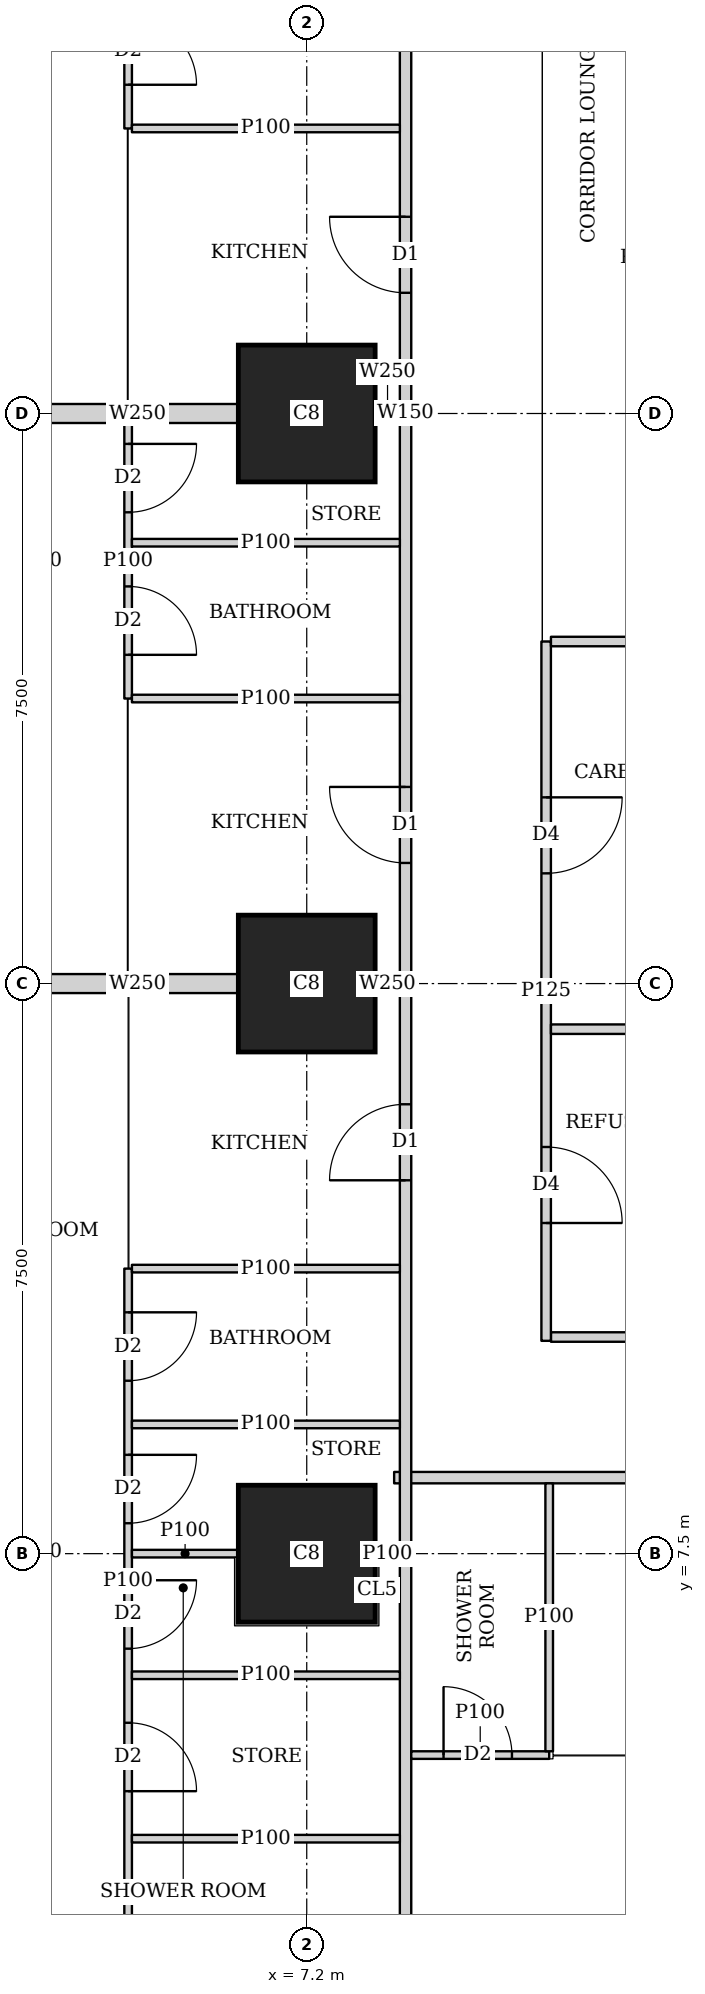
"""IFC4 building model, lengths in metres.
Left out: names, types, materials, properties, quantities, classifications, styles, units other than length and angle.
Written with IfcOpenShell. Run it as: python <this file> out.ifc"""

import sys

from ifc_helpers import new_model, si_unit, direction, frame, frame_2d, origin, origin_2d, place, context, subcontext, project, spatial, rectangle, extrude, element, fill, save


model = new_model("IFC4")
c1 = context("Model", 3, precision=1e-05, world=origin(), true_north=direction((0.0, 1.0)))
c2 = subcontext(c1, "Body", "Model", "MODEL_VIEW")
j1 = project(units=[si_unit("LENGTHUNIT", "METRE"), si_unit("PLANEANGLEUNIT", "RADIAN")], contexts=[c1])
p1 = place(None, origin())
s1 = spatial("IfcSite", under=j1, at=p1, CompositionType="ELEMENT")
p2 = place(p1, origin())
s2 = spatial("IfcBuilding", under=s1, at=p2, CompositionType="ELEMENT")
p3 = place(p2, frame((0.0, 0.0, 42.5)))
s3 = spatial("IfcBuildingStorey", under=s2, at=p3, CompositionType="ELEMENT", Elevation=42.5)
for number, where, z_axis, x_axis in (
    (1, (7.2, 7.5, 0.0), (0.0, 0.0, 1.0), (1.0, 0.0, 0.0)),
    (2, (7.2, 15.0, 0.0), (0.0, 0.0, 1.0), (1.0, 0.0, 0.0)),
    (3, (7.2, 22.5, 0.0), (0.0, 0.0, 1.0), (1.0, 0.0, 0.0)),
):
    element("IfcColumn", number, at=place(p3, frame(where, z_axis=z_axis, x_axis=x_axis)), inside=s3, PredefinedType="COLUMN", context=c2, shape_type="SweptSolid", body=[
        extrude(rectangle(XDim=1.8, YDim=1.8, at=origin_2d()), origin(), (0.0, 0.0, 1.0), 3.75),
    ])
p4 = place(p3, frame((8.5, 2.426, 0.0), z_axis=(0.0, 0.0, 1.0), x_axis=(0.0, 1.0, 0.0)))
e4 = element("IfcWall", 4, at=p4, inside=s3, PredefinedType="SOLIDWALL", context=c2, shape_type="SweptSolid", body=[
    extrude(rectangle(XDim=40.173, YDim=0.15, at=frame_2d((20.086, 0.0))), origin(), (0.0, 0.0, 1.0), 3.5),
])
p5 = place(p4, frame((9.986, 0.0, 0.0)))
e5 = element("IfcOpeningElement", 5, at=p5, cuts=e4, PredefinedType="OPENING", context=c2, shape_type="SweptSolid", body=[
    extrude(rectangle(XDim=1.0, YDim=2.1, at=frame_2d((0.5, 1.05))), frame((0.0, 0.085, 0.0), z_axis=(0.0, -1.0, 0.0), x_axis=(1.0, 0.0, 0.0)), (0.0, 0.0, 1.0), 0.17),
])
p6 = place(p4, frame((14.161, 0.0, 0.0)))
e6 = element("IfcOpeningElement", 6, at=p6, cuts=e4, PredefinedType="OPENING", context=c2, shape_type="SweptSolid", body=[
    extrude(rectangle(XDim=1.0, YDim=2.1, at=frame_2d((0.5, 1.05))), frame((0.0, 0.085, 0.0), z_axis=(0.0, -1.0, 0.0), x_axis=(1.0, 0.0, 0.0)), (0.0, 0.0, 1.0), 0.17),
])
p7 = place(p4, frame((21.662, 0.0, 0.0)))
e7 = element("IfcOpeningElement", 7, at=p7, cuts=e4, PredefinedType="OPENING", context=c2, shape_type="SweptSolid", body=[
    extrude(rectangle(XDim=1.0, YDim=2.1, at=frame_2d((0.5, 1.05))), frame((0.0, 0.085, 0.0), z_axis=(0.0, -1.0, 0.0), x_axis=(1.0, 0.0, 0.0)), (0.0, 0.0, 1.0), 0.17),
])
p8 = place(p4, frame((29.161, 0.0, 0.0)))
e8 = element("IfcOpeningElement", 8, at=p8, cuts=e4, PredefinedType="OPENING", context=c2, shape_type="SweptSolid", body=[
    extrude(rectangle(XDim=1.0, YDim=2.1, at=frame_2d((0.5, 1.05))), frame((0.0, 0.085, 0.0), z_axis=(0.0, -1.0, 0.0), x_axis=(1.0, 0.0, 0.0)), (0.0, 0.0, 1.0), 0.17),
])
p9 = place(p3, frame((40.054, 8.5, 0.0), z_axis=(0.0, 0.0, 1.0), x_axis=(-1.0, 0.0, 0.0)))
e9 = element("IfcWall", 9, at=p9, inside=s3, PredefinedType="SOLIDWALL", context=c2, shape_type="SweptSolid", body=[
    extrude(rectangle(XDim=31.704, YDim=0.15, at=frame_2d((15.852, 0.0))), origin(), (0.0, 0.0, 1.0), 3.5),
])
p10 = place(p9, frame((27.321, 0.0, 0.0)))
e10 = element("IfcOpeningElement", 10, at=p10, cuts=e9, PredefinedType="OPENING", context=c2, shape_type="SweptSolid", body=[
    extrude(rectangle(XDim=1.0, YDim=2.1, at=frame_2d((0.5, 1.05))), frame((0.0, 0.085, 0.0), z_axis=(0.0, -1.0, 0.0), x_axis=(1.0, 0.0, 0.0)), (0.0, 0.0, 1.0), 0.17),
])
p11 = place(p9, frame((23.054, 0.0, 0.0)))
e11 = element("IfcOpeningElement", 11, at=p11, cuts=e9, PredefinedType="OPENING", context=c2, shape_type="SweptSolid", body=[
    extrude(rectangle(XDim=1.0, YDim=2.1, at=frame_2d((0.5, 1.05))), frame((0.0, 0.085, 0.0), z_axis=(0.0, -1.0, 0.0), x_axis=(1.0, 0.0, 0.0)), (0.0, 0.0, 1.0), 0.17),
])
p12 = place(p9, frame((15.854, 0.0, 0.0)))
e12 = element("IfcOpeningElement", 12, at=p12, cuts=e9, PredefinedType="OPENING", context=c2, shape_type="SweptSolid", body=[
    extrude(rectangle(XDim=1.0, YDim=2.1, at=frame_2d((0.5, 1.05))), frame((0.0, 0.085, 0.0), z_axis=(0.0, -1.0, 0.0), x_axis=(1.0, 0.0, 0.0)), (0.0, 0.0, 1.0), 0.17),
])
p13 = place(p9, frame((8.654, 0.0, 0.0)))
e13 = element("IfcOpeningElement", 13, at=p13, cuts=e9, PredefinedType="OPENING", context=c2, shape_type="SweptSolid", body=[
    extrude(rectangle(XDim=1.0, YDim=2.1, at=frame_2d((0.5, 1.05))), frame((0.0, 0.085, 0.0), z_axis=(0.0, -1.0, 0.0), x_axis=(1.0, 0.0, 0.0)), (0.0, 0.0, 1.0), 0.17),
])
p14 = place(p9, frame((0.15, 0.0, 0.0)))
e14 = element("IfcOpeningElement", 14, at=p14, cuts=e9, PredefinedType="OPENING", context=c2, shape_type="SweptSolid", body=[
    extrude(rectangle(XDim=1.0, YDim=2.1, at=frame_2d((0.5, 1.05))), frame((0.0, 0.085, 0.0), z_axis=(0.0, -1.0, 0.0), x_axis=(1.0, 0.0, 0.0)), (0.0, 0.0, 1.0), 0.17),
])
p15 = place(p3, frame((4.85, 0.121, 0.0), z_axis=(0.0, 0.0, 1.0), x_axis=(0.0, 1.0, 0.0)))
e15 = element("IfcWall", 15, at=p15, inside=s3, PredefinedType="PARTITIONING", context=c2, shape_type="SweptSolid", body=[
    extrude(rectangle(XDim=2.897, YDim=0.1, at=frame_2d((1.448, 0.0))), origin(), (0.0, 0.0, 1.0), 2.05),
])
p16 = place(p3, frame((4.85, 3.018, 0.0), z_axis=(0.0, 0.0, 1.0), x_axis=(0.0, 1.0, 0.0)))
e16 = element("IfcWall", 16, at=p16, inside=s3, PredefinedType="PARTITIONING", context=c2, shape_type="SweptSolid", body=[
    extrude(rectangle(XDim=8.232, YDim=0.1, at=frame_2d((4.116, 0.0))), origin(), (0.0, 0.0, 1.0), 3.5),
])
p17 = place(p16, frame((6.757, 0.0, 0.0)))
e17 = element("IfcOpeningElement", 17, at=p17, cuts=e16, PredefinedType="OPENING", context=c2, shape_type="SweptSolid", body=[
    extrude(rectangle(XDim=0.9, YDim=2.1, at=frame_2d((0.45, 1.05))), frame((0.0, 0.06, 0.0), z_axis=(0.0, -1.0, 0.0), x_axis=(1.0, 0.0, 0.0)), (0.0, 0.0, 1.0), 0.12),
])
p18 = place(p16, frame((3.232, 0.0, 0.0)))
e18 = element("IfcOpeningElement", 18, at=p18, cuts=e16, PredefinedType="OPENING", context=c2, shape_type="SweptSolid", body=[
    extrude(rectangle(XDim=0.9, YDim=2.1, at=frame_2d((0.45, 1.05))), frame((0.0, 0.06, 0.0), z_axis=(0.0, -1.0, 0.0), x_axis=(1.0, 0.0, 0.0)), (0.0, 0.0, 1.0), 0.12),
])
p19 = place(p16, frame((4.882, 0.0, 0.0)))
e19 = element("IfcOpeningElement", 19, at=p19, cuts=e16, PredefinedType="OPENING", context=c2, shape_type="SweptSolid", body=[
    extrude(rectangle(XDim=0.9, YDim=2.1, at=frame_2d((0.45, 1.05))), frame((0.0, 0.06, 0.0), z_axis=(0.0, -1.0, 0.0), x_axis=(1.0, 0.0, 0.0)), (0.0, 0.0, 1.0), 0.12),
])
p20 = place(p16, frame((1.357, 0.0, 0.0)))
e20 = element("IfcOpeningElement", 20, at=p20, cuts=e16, PredefinedType="OPENING", context=c2, shape_type="SweptSolid", body=[
    extrude(rectangle(XDim=0.9, YDim=2.1, at=frame_2d((0.45, 1.05))), frame((0.0, 0.06, 0.0), z_axis=(0.0, -1.0, 0.0), x_axis=(1.0, 0.0, 0.0)), (0.0, 0.0, 1.0), 0.12),
])
p21 = place(p3, frame((4.9, 3.75, 0.0), z_axis=(0.0, 0.0, 1.0), x_axis=(1.0, 0.0, 0.0)))
e21 = element("IfcWall", 21, at=p21, inside=s3, PredefinedType="PARTITIONING", context=c2, shape_type="SweptSolid", body=[
    extrude(rectangle(XDim=3.525, YDim=0.1, at=frame_2d((1.763, 0.0))), origin(), (0.0, 0.0, 1.0), 3.5),
])
p22 = place(p3, frame((4.9, 7.5, 0.0), z_axis=(0.0, 0.0, 1.0), x_axis=(1.0, 0.0, 0.0)))
e22 = element("IfcWall", 22, at=p22, inside=s3, PredefinedType="PARTITIONING", context=c2, shape_type="SweptSolid", body=[
    extrude(rectangle(XDim=1.399, YDim=0.1, at=frame_2d((0.7, 0.0))), origin(), (0.0, 0.0, 1.0), 3.5),
])
p23 = place(p3, frame((8.101, 7.5, 0.0), z_axis=(0.0, 0.0, 1.0), x_axis=(1.0, 0.0, 0.0)))
e23 = element("IfcWall", 23, at=p23, inside=s3, PredefinedType="PARTITIONING", context=c2, shape_type="SweptSolid", body=[
    extrude(rectangle(XDim=0.324, YDim=0.1, at=frame_2d((0.162, 0.0))), origin(), (0.0, 0.0, 1.0), 3.5),
])
for number, where, z_axis, x_axis in (
    (24, (4.9, 11.25, 0.0), (0.0, 0.0, 1.0), (1.0, 0.0, 0.0)),
    (25, (4.9, 9.2, 0.0), (0.0, 0.0, 1.0), (1.0, 0.0, 0.0)),
    (26, (4.9, 5.9, 0.0), (0.0, 0.0, 1.0), (1.0, 0.0, 0.0)),
):
    element("IfcWall", number, at=place(p3, frame(where, z_axis=z_axis, x_axis=x_axis)), inside=s3, PredefinedType="PARTITIONING", context=c2, shape_type="SweptSolid", body=[
        extrude(rectangle(XDim=3.525, YDim=0.1, at=frame_2d((1.763, 0.0))), origin(), (0.0, 0.0, 1.0), 3.5),
    ])
p24 = place(p3, frame((4.85, 18.75, 0.0), z_axis=(0.0, 0.0, 1.0), x_axis=(0.0, 1.0, 0.0)))
e27 = element("IfcWall", 27, at=p24, inside=s3, PredefinedType="PARTITIONING", context=c2, shape_type="SweptSolid", body=[
    extrude(rectangle(XDim=3.625, YDim=0.1, at=frame_2d((1.812, 0.0))), origin(), (0.0, 0.0, 1.0), 3.5),
])
p25 = place(p24, frame((0.575, 0.0, 0.0)))
e28 = element("IfcOpeningElement", 28, at=p25, cuts=e27, PredefinedType="OPENING", context=c2, shape_type="SweptSolid", body=[
    extrude(rectangle(XDim=0.9, YDim=2.1, at=frame_2d((0.45, 1.05))), frame((0.0, 0.06, 0.0), z_axis=(0.0, -1.0, 0.0), x_axis=(1.0, 0.0, 0.0)), (0.0, 0.0, 1.0), 0.12),
])
p26 = place(p24, frame((2.45, 0.0, 0.0)))
e29 = element("IfcOpeningElement", 29, at=p26, cuts=e27, PredefinedType="OPENING", context=c2, shape_type="SweptSolid", body=[
    extrude(rectangle(XDim=0.9, YDim=2.1, at=frame_2d((0.45, 1.05))), frame((0.0, 0.06, 0.0), z_axis=(0.0, -1.0, 0.0), x_axis=(1.0, 0.0, 0.0)), (0.0, 0.0, 1.0), 0.12),
])
for number, where, z_axis, x_axis in (
    (30, (4.9, 18.75, 0.0), (0.0, 0.0, 1.0), (1.0, 0.0, 0.0)),
    (31, (4.9, 20.8, 0.0), (0.0, 0.0, 1.0), (1.0, 0.0, 0.0)),
):
    element("IfcWall", number, at=place(p3, frame(where, z_axis=z_axis, x_axis=x_axis)), inside=s3, PredefinedType="PARTITIONING", context=c2, shape_type="SweptSolid", body=[
        extrude(rectangle(XDim=3.525, YDim=0.1, at=frame_2d((1.763, 0.0))), origin(), (0.0, 0.0, 1.0), 3.5),
    ])
p27 = place(p3, frame((3.65, 15.0, 0.0), z_axis=(0.0, 0.0, 1.0), x_axis=(1.0, 0.0, 0.0)))
e32 = element("IfcWall", 32, at=p27, inside=s3, PredefinedType="SOLIDWALL", context=c2, shape_type="SweptSolid", body=[
    extrude(rectangle(XDim=2.649, YDim=0.25, at=frame_2d((1.325, 0.0))), origin(), (0.0, 0.0, 1.0), 3.5),
])
p28 = place(p3, frame((8.101, 15.0, 0.0), z_axis=(0.0, 0.0, 1.0), x_axis=(1.0, 0.0, 0.0)))
e33 = element("IfcWall", 33, at=p28, inside=s3, PredefinedType="SOLIDWALL", context=c2, shape_type="SweptSolid", body=[
    extrude(rectangle(XDim=0.324, YDim=0.25, at=frame_2d((0.162, 0.0))), origin(), (0.0, 0.0, 1.0), 3.5),
])
p29 = place(p3, frame((4.85, 26.25, 0.0), z_axis=(0.0, 0.0, 1.0), x_axis=(0.0, 1.0, 0.0)))
e34 = element("IfcWall", 34, at=p29, inside=s3, PredefinedType="PARTITIONING", context=c2, shape_type="SweptSolid", body=[
    extrude(rectangle(XDim=3.625, YDim=0.1, at=frame_2d((1.812, 0.0))), origin(), (0.0, 0.0, 1.0), 3.5),
])
p30 = place(p29, frame((0.575, 0.0, 0.0)))
e35 = element("IfcOpeningElement", 35, at=p30, cuts=e34, PredefinedType="OPENING", context=c2, shape_type="SweptSolid", body=[
    extrude(rectangle(XDim=0.9, YDim=2.1, at=frame_2d((0.45, 1.05))), frame((0.0, 0.06, 0.0), z_axis=(0.0, -1.0, 0.0), x_axis=(1.0, 0.0, 0.0)), (0.0, 0.0, 1.0), 0.12),
])
p31 = place(p29, frame((2.45, 0.0, 0.0)))
e36 = element("IfcOpeningElement", 36, at=p31, cuts=e34, PredefinedType="OPENING", context=c2, shape_type="SweptSolid", body=[
    extrude(rectangle(XDim=0.9, YDim=2.1, at=frame_2d((0.45, 1.05))), frame((0.0, 0.06, 0.0), z_axis=(0.0, -1.0, 0.0), x_axis=(1.0, 0.0, 0.0)), (0.0, 0.0, 1.0), 0.12),
])
p32 = place(p3, frame((4.9, 26.25, 0.0), z_axis=(0.0, 0.0, 1.0), x_axis=(1.0, 0.0, 0.0)))
e37 = element("IfcWall", 37, at=p32, inside=s3, PredefinedType="PARTITIONING", context=c2, shape_type="SweptSolid", body=[
    extrude(rectangle(XDim=3.525, YDim=0.1, at=frame_2d((1.763, 0.0))), origin(), (0.0, 0.0, 1.0), 3.5),
])
p33 = place(p3, frame((3.65, 22.5, 0.0), z_axis=(0.0, 0.0, 1.0), x_axis=(1.0, 0.0, 0.0)))
e38 = element("IfcWall", 38, at=p33, inside=s3, PredefinedType="SOLIDWALL", context=c2, shape_type="SweptSolid", body=[
    extrude(rectangle(XDim=2.649, YDim=0.25, at=frame_2d((1.325, 0.0))), origin(), (0.0, 0.0, 1.0), 3.5),
])
p34 = place(p3, frame((8.101, 22.5, 0.0), z_axis=(0.0, 0.0, 1.0), x_axis=(1.0, 0.0, 0.0)))
e39 = element("IfcWall", 39, at=p34, inside=s3, PredefinedType="SOLIDWALL", context=c2, shape_type="SweptSolid", body=[
    extrude(rectangle(XDim=0.324, YDim=0.25, at=frame_2d((0.162, 0.0))), origin(), (0.0, 0.0, 1.0), 3.5),
])
p35 = place(p3, frame((10.39, 4.85, 0.0), z_axis=(0.0, 0.0, 1.0), x_axis=(-1.0, 0.0, 0.0)))
e40 = element("IfcWall", 40, at=p35, inside=s3, PredefinedType="PARTITIONING", context=c2, shape_type="SweptSolid", body=[
    extrude(rectangle(XDim=1.815, YDim=0.1, at=frame_2d((0.907, 0.0))), origin(), (0.0, 0.0, 1.0), 3.5),
])
p36 = place(p35, frame((0.49, 0.0, 0.0)))
e41 = element("IfcOpeningElement", 41, at=p36, cuts=e40, PredefinedType="OPENING", context=c2, shape_type="SweptSolid", body=[
    extrude(rectangle(XDim=0.9, YDim=2.1, at=frame_2d((0.45, 1.05))), frame((0.0, 0.06, 0.0), z_axis=(0.0, -1.0, 0.0), x_axis=(1.0, 0.0, 0.0)), (0.0, 0.0, 1.0), 0.12),
])
p37 = place(p3, frame((10.39, 4.9, 0.0), z_axis=(0.0, 0.0, 1.0), x_axis=(0.0, 1.0, 0.0)))
e42 = element("IfcWall", 42, at=p37, inside=s3, PredefinedType="PARTITIONING", context=c2, shape_type="SweptSolid", body=[
    extrude(rectangle(XDim=3.525, YDim=0.1, at=frame_2d((1.763, 0.0))), origin(), (0.0, 0.0, 1.0), 3.5),
])
p38 = place(p3, frame((10.35, 10.3, 0.0), z_axis=(0.0, 0.0, 1.0), x_axis=(0.0, 1.0, 0.0)))
e43 = element("IfcWall", 43, at=p38, inside=s3, PredefinedType="PARTITIONING", context=c2, shape_type="SweptSolid", body=[
    extrude(rectangle(XDim=9.2, YDim=0.125, at=frame_2d((4.6, 0.0))), origin(), (0.0, 0.0, 1.0), 3.5),
])
p39 = place(p38, frame((1.55, 0.0, 0.0)))
e44 = element("IfcOpeningElement", 44, at=p39, cuts=e43, PredefinedType="OPENING", context=c2, shape_type="SweptSolid", body=[
    extrude(rectangle(XDim=1.0, YDim=2.1, at=frame_2d((0.5, 1.05))), frame((0.0, 0.073, 0.0), z_axis=(0.0, -1.0, 0.0), x_axis=(1.0, 0.0, 0.0)), (0.0, 0.0, 1.0), 0.145),
])
p40 = place(p38, frame((6.15, 0.0, 0.0)))
e45 = element("IfcOpeningElement", 45, at=p40, cuts=e43, PredefinedType="OPENING", context=c2, shape_type="SweptSolid", body=[
    extrude(rectangle(XDim=1.0, YDim=2.1, at=frame_2d((0.5, 1.05))), frame((0.0, 0.073, 0.0), z_axis=(0.0, -1.0, 0.0), x_axis=(1.0, 0.0, 0.0)), (0.0, 0.0, 1.0), 0.145),
])
p41 = place(p3, frame((10.413, 14.4, 0.0), z_axis=(0.0, 0.0, 1.0), x_axis=(1.0, 0.0, 0.0)))
e46 = element("IfcWall", 46, at=p41, inside=s3, PredefinedType="PARTITIONING", context=c2, shape_type="SweptSolid", body=[
    extrude(rectangle(XDim=3.475, YDim=0.125, at=frame_2d((1.737, 0.0))), origin(), (0.0, 0.0, 1.0), 3.5),
])
p42 = place(p3, frame((10.413, 19.5, 0.0), z_axis=(0.0, 0.0, 1.0), x_axis=(1.0, 0.0, 0.0)))
e47 = element("IfcWall", 47, at=p42, inside=s3, PredefinedType="PARTITIONING", context=c2, shape_type="SweptSolid", body=[
    extrude(rectangle(XDim=3.537, YDim=0.125, at=frame_2d((1.769, 0.0))), origin(), (0.0, 0.0, 1.0), 3.5),
])
p43 = place(p3, frame((10.413, 10.35, 0.0), z_axis=(0.0, 0.0, 1.0), x_axis=(1.0, 0.0, 0.0)))
e48 = element("IfcWall", 48, at=p43, inside=s3, PredefinedType="PARTITIONING", context=c2, shape_type="SweptSolid", body=[
    extrude(rectangle(XDim=10.837, YDim=0.125, at=frame_2d((5.418, 0.0))), origin(), (0.0, 0.0, 1.0), 3.5),
])
p44 = place(p43, frame((7.582, 0.0, 0.0)))
e49 = element("IfcOpeningElement", 49, at=p44, cuts=e48, PredefinedType="OPENING", context=c2, shape_type="SweptSolid", body=[
    extrude(rectangle(XDim=1.8, YDim=2.1, at=frame_2d((0.9, 1.05))), frame((0.0, 0.073, 0.0), z_axis=(0.0, -1.0, 0.0), x_axis=(1.0, 0.0, 0.0)), (0.0, 0.0, 1.0), 0.145),
])
p45 = place(p17, origin())
e50 = element("IfcDoor", 50, at=p45, inside=s3, OperationType="SINGLE_SWING_LEFT", PredefinedType="DOOR", context=c2, shape_type="SweptSolid", body=[
    extrude(rectangle(XDim=0.9, YDim=2.1, at=frame_2d((0.45, 1.05))), frame((0.0, 0.025, 0.0), z_axis=(0.0, -1.0, 0.0), x_axis=(1.0, 0.0, 0.0)), (0.0, 0.0, 1.0), 0.05),
])
fill(e17, e50)
p46 = place(p18, origin())
e51 = element("IfcDoor", 51, at=p46, inside=s3, OperationType="SINGLE_SWING_LEFT", PredefinedType="DOOR", context=c2, shape_type="SweptSolid", body=[
    extrude(rectangle(XDim=0.9, YDim=2.1, at=frame_2d((0.45, 1.05))), frame((0.0, 0.025, 0.0), z_axis=(0.0, -1.0, 0.0), x_axis=(1.0, 0.0, 0.0)), (0.0, 0.0, 1.0), 0.05),
])
fill(e18, e51)
p47 = place(p19, origin())
e52 = element("IfcDoor", 52, at=p47, inside=s3, OperationType="SINGLE_SWING_LEFT", PredefinedType="DOOR", context=c2, shape_type="SweptSolid", body=[
    extrude(rectangle(XDim=0.9, YDim=2.1, at=frame_2d((0.45, 1.05))), frame((0.0, 0.025, 0.0), z_axis=(0.0, -1.0, 0.0), x_axis=(1.0, 0.0, 0.0)), (0.0, 0.0, 1.0), 0.05),
])
fill(e19, e52)
p48 = place(p20, origin())
e53 = element("IfcDoor", 53, at=p48, inside=s3, OperationType="SINGLE_SWING_RIGHT", PredefinedType="DOOR", context=c2, shape_type="SweptSolid", body=[
    extrude(rectangle(XDim=0.9, YDim=2.1, at=frame_2d((0.45, 1.05))), frame((0.0, 0.025, 0.0), z_axis=(0.0, -1.0, 0.0), x_axis=(1.0, 0.0, 0.0)), (0.0, 0.0, 1.0), 0.05),
])
fill(e20, e53)
p49 = place(p5, origin())
e54 = element("IfcDoor", 54, at=p49, inside=s3, OperationType="SINGLE_SWING_LEFT", PredefinedType="DOOR", context=c2, shape_type="SweptSolid", body=[
    extrude(rectangle(XDim=1.0, YDim=2.1, at=frame_2d((0.5, 1.05))), frame((0.0, 0.025, 0.0), z_axis=(0.0, -1.0, 0.0), x_axis=(1.0, 0.0, 0.0)), (0.0, 0.0, 1.0), 0.05),
])
fill(e5, e54)
p50 = place(p25, origin())
e55 = element("IfcDoor", 55, at=p50, inside=s3, OperationType="SINGLE_SWING_RIGHT", PredefinedType="DOOR", context=c2, shape_type="SweptSolid", body=[
    extrude(rectangle(XDim=0.9, YDim=2.1, at=frame_2d((0.45, 1.05))), frame((0.0, 0.025, 0.0), z_axis=(0.0, -1.0, 0.0), x_axis=(1.0, 0.0, 0.0)), (0.0, 0.0, 1.0), 0.05),
])
fill(e28, e55)
p51 = place(p26, origin())
e56 = element("IfcDoor", 56, at=p51, inside=s3, OperationType="SINGLE_SWING_LEFT", PredefinedType="DOOR", context=c2, shape_type="SweptSolid", body=[
    extrude(rectangle(XDim=0.9, YDim=2.1, at=frame_2d((0.45, 1.05))), frame((0.0, 0.025, 0.0), z_axis=(0.0, -1.0, 0.0), x_axis=(1.0, 0.0, 0.0)), (0.0, 0.0, 1.0), 0.05),
])
fill(e29, e56)
p52 = place(p6, origin())
e57 = element("IfcDoor", 57, at=p52, inside=s3, OperationType="SINGLE_SWING_RIGHT", PredefinedType="DOOR", context=c2, shape_type="SweptSolid", body=[
    extrude(rectangle(XDim=1.0, YDim=2.1, at=frame_2d((0.5, 1.05))), frame((0.0, 0.025, 0.0), z_axis=(0.0, -1.0, 0.0), x_axis=(1.0, 0.0, 0.0)), (0.0, 0.0, 1.0), 0.05),
])
fill(e6, e57)
p53 = place(p30, origin())
e58 = element("IfcDoor", 58, at=p53, inside=s3, OperationType="SINGLE_SWING_RIGHT", PredefinedType="DOOR", context=c2, shape_type="SweptSolid", body=[
    extrude(rectangle(XDim=0.9, YDim=2.1, at=frame_2d((0.45, 1.05))), frame((0.0, 0.025, 0.0), z_axis=(0.0, -1.0, 0.0), x_axis=(1.0, 0.0, 0.0)), (0.0, 0.0, 1.0), 0.05),
])
fill(e35, e58)
p54 = place(p7, origin())
e59 = element("IfcDoor", 59, at=p54, inside=s3, OperationType="SINGLE_SWING_RIGHT", PredefinedType="DOOR", context=c2, shape_type="SweptSolid", body=[
    extrude(rectangle(XDim=1.0, YDim=2.1, at=frame_2d((0.5, 1.05))), frame((0.0, 0.025, 0.0), z_axis=(0.0, -1.0, 0.0), x_axis=(1.0, 0.0, 0.0)), (0.0, 0.0, 1.0), 0.05),
])
fill(e7, e59)
p55 = place(p36, origin())
e60 = element("IfcDoor", 60, at=p55, inside=s3, OperationType="SINGLE_SWING_LEFT", PredefinedType="DOOR", context=c2, shape_type="SweptSolid", body=[
    extrude(rectangle(XDim=0.9, YDim=2.1, at=frame_2d((0.45, 1.05))), frame((0.0, 0.025, 0.0), z_axis=(0.0, -1.0, 0.0), x_axis=(1.0, 0.0, 0.0)), (0.0, 0.0, 1.0), 0.05),
])
fill(e41, e60)
p56 = place(p39, origin())
e61 = element("IfcDoor", 61, at=p56, inside=s3, OperationType="SINGLE_SWING_RIGHT", PredefinedType="DOOR", context=c2, shape_type="SweptSolid", body=[
    extrude(rectangle(XDim=1.0, YDim=2.1, at=frame_2d((0.5, 1.05))), frame((0.0, 0.025, 0.0), z_axis=(0.0, -1.0, 0.0), x_axis=(1.0, 0.0, 0.0)), (0.0, 0.0, 1.0), 0.05),
])
fill(e44, e61)
p57 = place(p40, origin())
e62 = element("IfcDoor", 62, at=p57, inside=s3, OperationType="SINGLE_SWING_LEFT", PredefinedType="DOOR", context=c2, shape_type="SweptSolid", body=[
    extrude(rectangle(XDim=1.0, YDim=2.1, at=frame_2d((0.5, 1.05))), frame((0.0, 0.025, 0.0), z_axis=(0.0, -1.0, 0.0), x_axis=(1.0, 0.0, 0.0)), (0.0, 0.0, 1.0), 0.05),
])
fill(e45, e62)
save(model, sys.argv[1])
